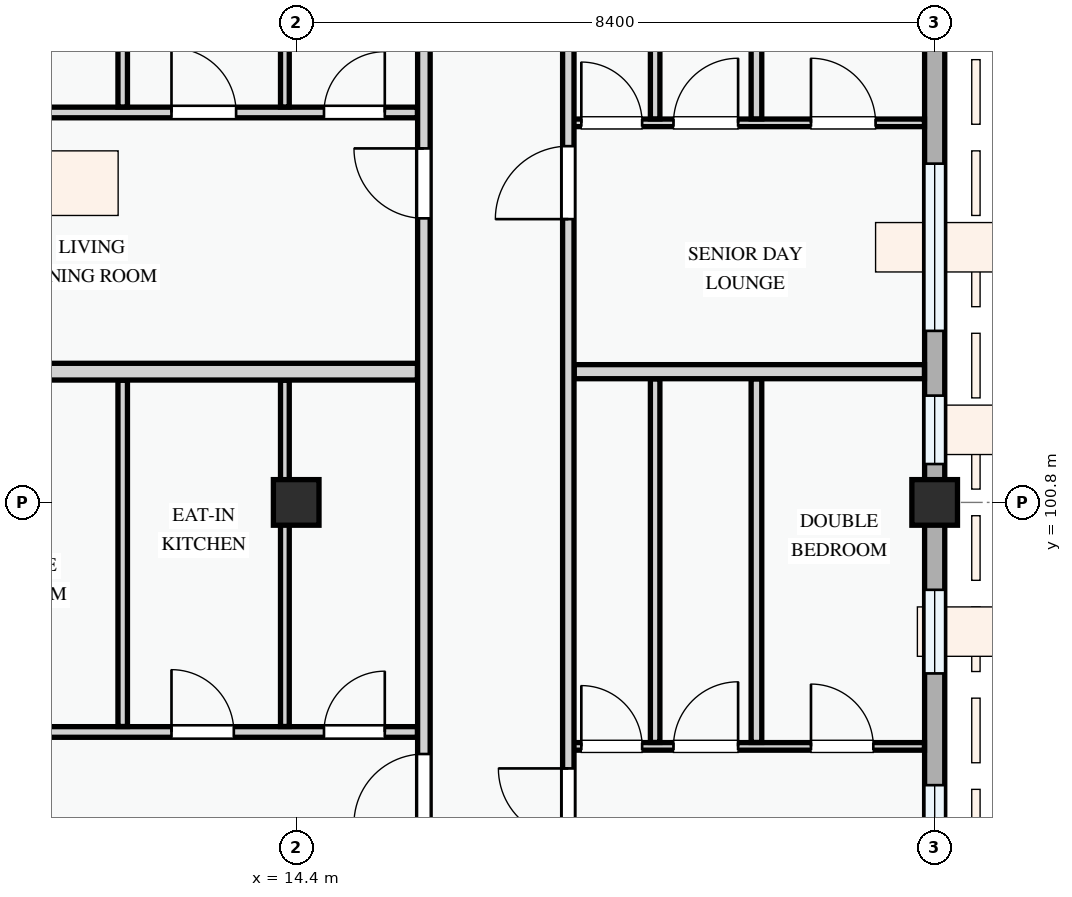
"""IFC4 building model, lengths in metres.
Left out: names, types, materials, properties, quantities, classifications, styles, units other than length and angle.
Written with IfcOpenShell. Run it as: python <this file> out.ifc"""

import sys

from ifc_helpers import new_model, si_unit, direction, frame, frame_2d, origin, origin_2d, place, context, subcontext, project, spatial, rectangle, extrude, element, fill, save


model = new_model("IFC4")
c1 = context("Model", 3, precision=1e-05, world=origin(), true_north=direction((0.0, 1.0)))
c2 = subcontext(c1, "Body", "Model", "MODEL_VIEW")
j1 = project(units=[si_unit("LENGTHUNIT", "METRE"), si_unit("PLANEANGLEUNIT", "RADIAN")], contexts=[c1])
p1 = place(None, origin())
s1 = spatial("IfcSite", under=j1, at=p1, CompositionType="ELEMENT")
p2 = place(p1, origin())
s2 = spatial("IfcBuilding", under=s1, at=p2, CompositionType="ELEMENT")
p3 = place(p2, frame((0.0, 0.0, 34.5)))
s3 = spatial("IfcBuildingStorey", under=s2, at=p3, CompositionType="ELEMENT", Elevation=34.5)
for number, where, z_axis, x_axis in (
    (1, (14.4, 100.8, 0.0), (0.0, 0.0, 1.0), (1.0, 0.0, 0.0)),
    (2, (22.8, 100.8, 0.0), (0.0, 0.0, 1.0), (1.0, 0.0, 0.0)),
):
    element("IfcColumn", number, at=place(p3, frame(where, z_axis=z_axis, x_axis=x_axis)), inside=s3, PredefinedType="COLUMN", context=c2, shape_type="SweptSolid", body=[
        extrude(rectangle(XDim=0.6, YDim=0.6, at=origin_2d()), origin(), (0.0, 0.0, 1.0), 3.3),
    ])
p4 = place(p3, frame((22.8, 94.8, 0.0), z_axis=(0.0, 0.0, 1.0), x_axis=(0.0, 1.0, 0.0)))
e3 = element("IfcWall", 3, at=p4, inside=s3, PredefinedType="STANDARD", context=c2, shape_type="SweptSolid", body=[
    extrude(rectangle(XDim=6.0, YDim=0.265, at=frame_2d((3.0, 0.0))), origin(), (0.0, 0.0, 1.0), 2.575),
])
p5 = place(p4, frame((0.7, 0.0, 0.78)))
e4 = element("IfcOpeningElement", 4, at=p5, cuts=e3, PredefinedType="OPENING", context=c2, shape_type="SweptSolid", body=[
    extrude(rectangle(XDim=1.58, YDim=1.48, at=frame_2d((0.79, 0.74))), frame((0.0, 0.143, 0.0), z_axis=(0.0, -1.0, 0.0), x_axis=(1.0, 0.0, 0.0)), (0.0, 0.0, 1.0), 0.285),
])
p6 = place(p4, frame((3.75, 0.0, 0.78)))
e5 = element("IfcOpeningElement", 5, at=p6, cuts=e3, PredefinedType="OPENING", context=c2, shape_type="SweptSolid", body=[
    extrude(rectangle(XDim=1.1, YDim=1.3, at=frame_2d((0.55, 0.65))), frame((0.0, 0.143, 0.0), z_axis=(0.0, -1.0, 0.0), x_axis=(1.0, 0.0, 0.0)), (0.0, 0.0, 1.0), 0.285),
])
p7 = place(p3, frame((22.8, 100.8, 0.0), z_axis=(0.0, 0.0, 1.0), x_axis=(0.0, 1.0, 0.0)))
e6 = element("IfcWall", 6, at=p7, inside=s3, PredefinedType="STANDARD", context=c2, shape_type="SweptSolid", body=[
    extrude(rectangle(XDim=8.4, YDim=0.265, at=frame_2d((4.2, 0.0))), origin(), (0.0, 0.0, 1.0), 2.425),
])
p8 = place(p7, frame((0.505, 0.0, 0.78)))
e7 = element("IfcOpeningElement", 7, at=p8, cuts=e6, PredefinedType="OPENING", context=c2, shape_type="SweptSolid", body=[
    extrude(rectangle(XDim=0.9, YDim=1.2, at=frame_2d((0.45, 0.6))), frame((0.0, 0.143, 0.0), z_axis=(0.0, -1.0, 0.0), x_axis=(1.0, 0.0, 0.0)), (0.0, 0.0, 1.0), 0.285),
])
p9 = place(p7, frame((2.257, 0.0, 0.78)))
e8 = element("IfcOpeningElement", 8, at=p9, cuts=e6, PredefinedType="OPENING", context=c2, shape_type="SweptSolid", body=[
    extrude(rectangle(XDim=2.2, YDim=1.5, at=frame_2d((1.1, 0.75))), frame((0.0, 0.143, 0.0), z_axis=(0.0, -1.0, 0.0), x_axis=(1.0, 0.0, 0.0)), (0.0, 0.0, 1.0), 0.285),
])
p10 = place(p7, frame((5.977, 0.0, 0.78)))
e9 = element("IfcOpeningElement", 9, at=p10, cuts=e6, PredefinedType="OPENING", context=c2, shape_type="SweptSolid", body=[
    extrude(rectangle(XDim=1.25, YDim=1.45, at=frame_2d((0.625, 0.725))), frame((0.0, 0.143, 0.0), z_axis=(0.0, -1.0, 0.0), x_axis=(1.0, 0.0, 0.0)), (0.0, 0.0, 1.0), 0.285),
])
p11 = place(p3, frame((8.534, 97.78, 0.0), z_axis=(0.0, 0.0, 1.0), x_axis=(1.0, 0.0, 0.0)))
e10 = element("IfcWall", 10, at=p11, inside=s3, PredefinedType="PARTITIONING", context=c2, shape_type="SweptSolid", body=[
    extrude(rectangle(XDim=7.461, YDim=0.14, at=frame_2d((3.73, 0.0))), origin(), (0.0, 0.0, 1.0), 3.0),
])
p12 = place(p11, frame((1.329, 0.0, 0.0)))
e11 = element("IfcOpeningElement", 11, at=p12, cuts=e10, PredefinedType="OPENING", context=c2, shape_type="SweptSolid", body=[
    extrude(rectangle(XDim=0.85, YDim=2.1, at=frame_2d((0.425, 1.05))), frame((0.0, 0.08, 0.0), z_axis=(0.0, -1.0, 0.0), x_axis=(1.0, 0.0, 0.0)), (0.0, 0.0, 1.0), 0.16),
])
p13 = place(p11, frame((4.225, 0.0, 0.0)))
e12 = element("IfcOpeningElement", 12, at=p13, cuts=e10, PredefinedType="OPENING", context=c2, shape_type="SweptSolid", body=[
    extrude(rectangle(XDim=0.82, YDim=2.08, at=frame_2d((0.41, 1.04))), frame((0.0, 0.08, 0.0), z_axis=(0.0, -1.0, 0.0), x_axis=(1.0, 0.0, 0.0)), (0.0, 0.0, 1.0), 0.16),
])
p14 = place(p11, frame((6.231, 0.0, 0.0)))
e13 = element("IfcOpeningElement", 13, at=p14, cuts=e10, PredefinedType="OPENING", context=c2, shape_type="SweptSolid", body=[
    extrude(rectangle(XDim=0.8, YDim=2.1, at=frame_2d((0.4, 1.05))), frame((0.0, 0.08, 0.0), z_axis=(0.0, -1.0, 0.0), x_axis=(1.0, 0.0, 0.0)), (0.0, 0.0, 1.0), 0.16),
])
p15 = place(p3, frame((12.118, 97.852, 0.0), z_axis=(0.0, 0.0, 1.0), x_axis=(0.0, 1.0, 0.0)))
e14 = element("IfcWall", 14, at=p15, inside=s3, PredefinedType="PARTITIONING", context=c2, shape_type="SweptSolid", body=[
    extrude(rectangle(XDim=4.556, YDim=0.125, at=frame_2d((2.278, 0.0))), origin(), (0.0, 0.0, 1.0), 3.0),
])
p16 = place(p3, frame((14.251, 97.852, 0.0), z_axis=(0.0, 0.0, 1.0), x_axis=(0.0, 1.0, 0.0)))
e15 = element("IfcWall", 15, at=p16, inside=s3, PredefinedType="PARTITIONING", context=c2, shape_type="SweptSolid", body=[
    extrude(rectangle(XDim=4.556, YDim=0.115, at=frame_2d((2.278, 0.0))), origin(), (0.0, 0.0, 1.0), 2.425),
])
p17 = place(p3, frame((17.98, 97.59, 0.0), z_axis=(0.0, 0.0, 1.0), x_axis=(1.0, 0.0, 0.0)))
e16 = element("IfcWall", 16, at=p17, inside=s3, PredefinedType="PARTITIONING", context=c2, shape_type="SweptSolid", body=[
    extrude(rectangle(XDim=4.686, YDim=0.1, at=frame_2d((2.343, 0.0))), origin(), (0.0, 0.0, 1.0), 3.0),
])
p18 = place(p17, frame((0.171, 0.0, 0.0)))
e17 = element("IfcOpeningElement", 17, at=p18, cuts=e16, PredefinedType="OPENING", context=c2, shape_type="SweptSolid", body=[
    extrude(rectangle(XDim=0.8, YDim=2.1, at=frame_2d((0.4, 1.05))), frame((0.0, 0.06, 0.0), z_axis=(0.0, -1.0, 0.0), x_axis=(1.0, 0.0, 0.0)), (0.0, 0.0, 1.0), 0.12),
])
p19 = place(p17, frame((1.384, 0.0, 0.0)))
e18 = element("IfcOpeningElement", 18, at=p19, cuts=e16, PredefinedType="OPENING", context=c2, shape_type="SweptSolid", body=[
    extrude(rectangle(XDim=0.85, YDim=2.1, at=frame_2d((0.425, 1.05))), frame((0.0, 0.06, 0.0), z_axis=(0.0, -1.0, 0.0), x_axis=(1.0, 0.0, 0.0)), (0.0, 0.0, 1.0), 0.12),
])
p20 = place(p17, frame((3.193, 0.0, 0.0)))
e19 = element("IfcOpeningElement", 19, at=p20, cuts=e16, PredefinedType="OPENING", context=c2, shape_type="SweptSolid", body=[
    extrude(rectangle(XDim=0.82, YDim=2.08, at=frame_2d((0.41, 1.04))), frame((0.0, 0.06, 0.0), z_axis=(0.0, -1.0, 0.0), x_axis=(1.0, 0.0, 0.0)), (0.0, 0.0, 1.0), 0.12),
])
p21 = place(p3, frame((20.455, 97.642, 0.0), z_axis=(0.0, 0.0, 1.0), x_axis=(0.0, 1.0, 0.0)))
e20 = element("IfcWall", 20, at=p21, inside=s3, PredefinedType="PARTITIONING", context=c2, shape_type="SweptSolid", body=[
    extrude(rectangle(XDim=4.783, YDim=0.14, at=frame_2d((2.392, 0.0))), origin(), (0.0, 0.0, 1.0), 3.0),
])
p22 = place(p3, frame((19.122, 97.642, 0.0), z_axis=(0.0, 0.0, 1.0), x_axis=(0.0, 1.0, 0.0)))
e21 = element("IfcWall", 21, at=p22, inside=s3, PredefinedType="PARTITIONING", context=c2, shape_type="SweptSolid", body=[
    extrude(rectangle(XDim=4.783, YDim=0.125, at=frame_2d((2.392, 0.0))), origin(), (0.0, 0.0, 1.0), 3.0),
])
p23 = place(p3, frame((8.534, 105.93, 0.0), z_axis=(0.0, 0.0, 1.0), x_axis=(1.0, 0.0, 0.0)))
e22 = element("IfcWall", 22, at=p23, inside=s3, PredefinedType="PARTITIONING", context=c2, shape_type="SweptSolid", body=[
    extrude(rectangle(XDim=7.461, YDim=0.14, at=frame_2d((3.73, 0.0))), origin(), (0.0, 0.0, 1.0), 3.0),
])
p24 = place(p23, frame((1.329, 0.0, 0.0)))
e23 = element("IfcOpeningElement", 23, at=p24, cuts=e22, PredefinedType="OPENING", context=c2, shape_type="SweptSolid", body=[
    extrude(rectangle(XDim=0.85, YDim=2.1, at=frame_2d((0.425, 1.05))), frame((0.0, 0.08, 0.0), z_axis=(0.0, -1.0, 0.0), x_axis=(1.0, 0.0, 0.0)), (0.0, 0.0, 1.0), 0.16),
])
p25 = place(p23, frame((4.225, 0.0, 0.0)))
e24 = element("IfcOpeningElement", 24, at=p25, cuts=e22, PredefinedType="OPENING", context=c2, shape_type="SweptSolid", body=[
    extrude(rectangle(XDim=0.85, YDim=2.1, at=frame_2d((0.425, 1.05))), frame((0.0, 0.08, 0.0), z_axis=(0.0, -1.0, 0.0), x_axis=(1.0, 0.0, 0.0)), (0.0, 0.0, 1.0), 0.16),
])
p26 = place(p23, frame((6.231, 0.0, 0.0)))
e25 = element("IfcOpeningElement", 25, at=p26, cuts=e22, PredefinedType="OPENING", context=c2, shape_type="SweptSolid", body=[
    extrude(rectangle(XDim=0.8, YDim=2.1, at=frame_2d((0.4, 1.05))), frame((0.0, 0.08, 0.0), z_axis=(0.0, -1.0, 0.0), x_axis=(1.0, 0.0, 0.0)), (0.0, 0.0, 1.0), 0.16),
])
p27 = place(p3, frame((12.118, 106.002, 0.0), z_axis=(0.0, 0.0, 1.0), x_axis=(0.0, 1.0, 0.0)))
e26 = element("IfcWall", 26, at=p27, inside=s3, PredefinedType="PARTITIONING", context=c2, shape_type="SweptSolid", body=[
    extrude(rectangle(XDim=3.236, YDim=0.125, at=frame_2d((1.618, 0.0))), origin(), (0.0, 0.0, 1.0), 3.0),
])
p28 = place(p3, frame((14.251, 106.002, 0.0), z_axis=(0.0, 0.0, 1.0), x_axis=(0.0, 1.0, 0.0)))
e27 = element("IfcWall", 27, at=p28, inside=s3, PredefinedType="PARTITIONING", context=c2, shape_type="SweptSolid", body=[
    extrude(rectangle(XDim=3.236, YDim=0.115, at=frame_2d((1.618, 0.0))), origin(), (0.0, 0.0, 1.0), 2.425),
])
p29 = place(p3, frame((17.98, 105.794, 0.0), z_axis=(0.0, 0.0, 1.0), x_axis=(1.0, 0.0, 0.0)))
e28 = element("IfcWall", 28, at=p29, inside=s3, PredefinedType="PARTITIONING", context=c2, shape_type="SweptSolid", body=[
    extrude(rectangle(XDim=4.686, YDim=0.1, at=frame_2d((2.343, 0.0))), origin(), (0.0, 0.0, 1.0), 3.0),
])
p30 = place(p29, frame((0.171, 0.0, 0.0)))
e29 = element("IfcOpeningElement", 29, at=p30, cuts=e28, PredefinedType="OPENING", context=c2, shape_type="SweptSolid", body=[
    extrude(rectangle(XDim=0.8, YDim=2.1, at=frame_2d((0.4, 1.05))), frame((0.0, 0.06, 0.0), z_axis=(0.0, -1.0, 0.0), x_axis=(1.0, 0.0, 0.0)), (0.0, 0.0, 1.0), 0.12),
])
p31 = place(p29, frame((1.384, 0.0, 0.0)))
e30 = element("IfcOpeningElement", 30, at=p31, cuts=e28, PredefinedType="OPENING", context=c2, shape_type="SweptSolid", body=[
    extrude(rectangle(XDim=0.85, YDim=2.1, at=frame_2d((0.425, 1.05))), frame((0.0, 0.06, 0.0), z_axis=(0.0, -1.0, 0.0), x_axis=(1.0, 0.0, 0.0)), (0.0, 0.0, 1.0), 0.12),
])
p32 = place(p29, frame((3.193, 0.0, 0.0)))
e31 = element("IfcOpeningElement", 31, at=p32, cuts=e28, PredefinedType="OPENING", context=c2, shape_type="SweptSolid", body=[
    extrude(rectangle(XDim=0.85, YDim=2.1, at=frame_2d((0.425, 1.05))), frame((0.0, 0.06, 0.0), z_axis=(0.0, -1.0, 0.0), x_axis=(1.0, 0.0, 0.0)), (0.0, 0.0, 1.0), 0.12),
])
p33 = place(p3, frame((20.455, 105.846, 0.0), z_axis=(0.0, 0.0, 1.0), x_axis=(0.0, 1.0, 0.0)))
e32 = element("IfcWall", 32, at=p33, inside=s3, PredefinedType="PARTITIONING", context=c2, shape_type="SweptSolid", body=[
    extrude(rectangle(XDim=3.382, YDim=0.14, at=frame_2d((1.691, 0.0))), origin(), (0.0, 0.0, 1.0), 3.0),
])
p34 = place(p3, frame((19.122, 105.846, 0.0), z_axis=(0.0, 0.0, 1.0), x_axis=(0.0, 1.0, 0.0)))
e33 = element("IfcWall", 33, at=p34, inside=s3, PredefinedType="PARTITIONING", context=c2, shape_type="SweptSolid", body=[
    extrude(rectangle(XDim=3.382, YDim=0.125, at=frame_2d((1.691, 0.0))), origin(), (0.0, 0.0, 1.0), 3.0),
])
p35 = place(p3, frame((8.534, 102.52, 0.0), z_axis=(0.0, 0.0, 1.0), x_axis=(1.0, 0.0, 0.0)))
e34 = element("IfcWall", 34, at=p35, inside=s3, PredefinedType="PARTITIONING", context=c2, shape_type="SweptSolid", body=[
    extrude(rectangle(XDim=7.461, YDim=0.22, at=frame_2d((3.73, 0.0))), origin(), (0.0, 0.0, 1.0), 3.0),
])
p36 = place(p3, frame((18.057, 102.52, 0.0), z_axis=(0.0, 0.0, 1.0), x_axis=(1.0, 0.0, 0.0)))
e35 = element("IfcWall", 35, at=p36, inside=s3, PredefinedType="PARTITIONING", context=c2, shape_type="SweptSolid", body=[
    extrude(rectangle(XDim=4.609, YDim=0.185, at=frame_2d((2.304, 0.0))), origin(), (0.0, 0.0, 1.0), 3.0),
])
p37 = place(p3, frame((16.08, 86.534, 0.0), z_axis=(0.0, 0.0, 1.0), x_axis=(0.0, 1.0, 0.0)))
e36 = element("IfcWall", 36, at=p37, inside=s3, PredefinedType="PARTITIONING", context=c2, shape_type="SweptSolid", body=[
    extrude(rectangle(XDim=22.806, YDim=0.165, at=frame_2d((11.403, 0.0))), origin(), (0.0, 0.0, 1.0), 3.0),
])
p38 = place(p37, frame((2.006, 0.0, 0.0)))
e37 = element("IfcOpeningElement", 37, at=p38, cuts=e36, PredefinedType="OPENING", context=c2, shape_type="SweptSolid", body=[
    extrude(rectangle(XDim=0.96, YDim=2.12, at=frame_2d((0.48, 1.06))), frame((0.0, 0.093, 0.0), z_axis=(0.0, -1.0, 0.0), x_axis=(1.0, 0.0, 0.0)), (0.0, 0.0, 1.0), 0.185),
])
p39 = place(p37, frame((10.035, 0.0, 0.0)))
e38 = element("IfcOpeningElement", 38, at=p39, cuts=e36, PredefinedType="OPENING", context=c2, shape_type="SweptSolid", body=[
    extrude(rectangle(XDim=0.92, YDim=2.1, at=frame_2d((0.46, 1.05))), frame((0.0, 0.093, 0.0), z_axis=(0.0, -1.0, 0.0), x_axis=(1.0, 0.0, 0.0)), (0.0, 0.0, 1.0), 0.185),
])
p40 = place(p37, frame((18.003, 0.0, 0.0)))
e39 = element("IfcOpeningElement", 39, at=p40, cuts=e36, PredefinedType="OPENING", context=c2, shape_type="SweptSolid", body=[
    extrude(rectangle(XDim=0.92, YDim=2.1, at=frame_2d((0.46, 1.05))), frame((0.0, 0.093, 0.0), z_axis=(0.0, -1.0, 0.0), x_axis=(1.0, 0.0, 0.0)), (0.0, 0.0, 1.0), 0.185),
])
p41 = place(p3, frame((17.98, 86.534, 0.0), z_axis=(0.0, 0.0, 1.0), x_axis=(0.0, 1.0, 0.0)))
e40 = element("IfcWall", 40, at=p41, inside=s3, PredefinedType="PARTITIONING", context=c2, shape_type="SweptSolid", body=[
    extrude(rectangle(XDim=22.806, YDim=0.15, at=frame_2d((11.403, 0.0))), origin(), (0.0, 0.0, 1.0), 3.0),
])
p42 = place(p41, frame((1.874, 0.0, 0.0)))
e41 = element("IfcOpeningElement", 41, at=p42, cuts=e40, PredefinedType="OPENING", context=c2, shape_type="SweptSolid", body=[
    extrude(rectangle(XDim=0.92, YDim=2.1, at=frame_2d((0.46, 1.05))), frame((0.0, 0.085, 0.0), z_axis=(0.0, -1.0, 0.0), x_axis=(1.0, 0.0, 0.0)), (0.0, 0.0, 1.0), 0.17),
])
p43 = place(p41, frame((9.846, 0.0, 0.0)))
e42 = element("IfcOpeningElement", 42, at=p43, cuts=e40, PredefinedType="OPENING", context=c2, shape_type="SweptSolid", body=[
    extrude(rectangle(XDim=0.92, YDim=2.1, at=frame_2d((0.46, 1.05))), frame((0.0, 0.085, 0.0), z_axis=(0.0, -1.0, 0.0), x_axis=(1.0, 0.0, 0.0)), (0.0, 0.0, 1.0), 0.17),
])
p44 = place(p41, frame((17.992, 0.0, 0.0)))
e43 = element("IfcOpeningElement", 43, at=p44, cuts=e40, PredefinedType="OPENING", context=c2, shape_type="SweptSolid", body=[
    extrude(rectangle(XDim=0.96, YDim=2.12, at=frame_2d((0.48, 1.06))), frame((0.0, 0.085, 0.0), z_axis=(0.0, -1.0, 0.0), x_axis=(1.0, 0.0, 0.0)), (0.0, 0.0, 1.0), 0.17),
])
p45 = place(p5, origin())
e44 = element("IfcWindow", 44, at=p45, inside=s3, PartitioningType="SINGLE_PANEL", PredefinedType="WINDOW", context=c2, shape_type="SweptSolid", body=[
    extrude(rectangle(XDim=1.58, YDim=1.48, at=frame_2d((0.79, 0.74))), frame((0.0, 0.03, 0.0), z_axis=(0.0, -1.0, 0.0), x_axis=(1.0, 0.0, 0.0)), (0.0, 0.0, 1.0), 0.06),
])
fill(e4, e44)
p46 = place(p6, origin())
e45 = element("IfcWindow", 45, at=p46, inside=s3, PartitioningType="SINGLE_PANEL", PredefinedType="WINDOW", context=c2, shape_type="SweptSolid", body=[
    extrude(rectangle(XDim=1.1, YDim=1.3, at=frame_2d((0.55, 0.65))), frame((0.0, 0.03, 0.0), z_axis=(0.0, -1.0, 0.0), x_axis=(1.0, 0.0, 0.0)), (0.0, 0.0, 1.0), 0.06),
])
fill(e5, e45)
p47 = place(p8, origin())
e46 = element("IfcWindow", 46, at=p47, inside=s3, PartitioningType="SINGLE_PANEL", PredefinedType="WINDOW", context=c2, shape_type="SweptSolid", body=[
    extrude(rectangle(XDim=0.9, YDim=1.2, at=frame_2d((0.45, 0.6))), frame((0.0, 0.03, 0.0), z_axis=(0.0, -1.0, 0.0), x_axis=(1.0, 0.0, 0.0)), (0.0, 0.0, 1.0), 0.06),
])
fill(e7, e46)
p48 = place(p9, origin())
e47 = element("IfcWindow", 47, at=p48, inside=s3, PartitioningType="DOUBLE_PANEL_VERTICAL", PredefinedType="WINDOW", context=c2, shape_type="SweptSolid", body=[
    extrude(rectangle(XDim=2.2, YDim=1.5, at=frame_2d((1.1, 0.75))), frame((0.0, 0.03, 0.0), z_axis=(0.0, -1.0, 0.0), x_axis=(1.0, 0.0, 0.0)), (0.0, 0.0, 1.0), 0.06),
])
fill(e8, e47)
p49 = place(p13, origin())
e48 = element("IfcDoor", 48, at=p49, inside=s3, OperationType="SINGLE_SWING_LEFT", PredefinedType="DOOR", context=c2, shape_type="SweptSolid", body=[
    extrude(rectangle(XDim=0.82, YDim=2.08, at=frame_2d((0.41, 1.04))), frame((0.0, 0.025, 0.0), z_axis=(0.0, -1.0, 0.0), x_axis=(1.0, 0.0, 0.0)), (0.0, 0.0, 1.0), 0.05),
])
fill(e12, e48)
p50 = place(p14, origin())
e49 = element("IfcDoor", 49, at=p50, inside=s3, OperationType="SINGLE_SWING_RIGHT", PredefinedType="DOOR", context=c2, shape_type="SweptSolid", body=[
    extrude(rectangle(XDim=0.8, YDim=2.1, at=frame_2d((0.4, 1.05))), frame((0.0, 0.025, 0.0), z_axis=(0.0, -1.0, 0.0), x_axis=(1.0, 0.0, 0.0)), (0.0, 0.0, 1.0), 0.05),
])
fill(e13, e49)
p51 = place(p18, origin())
e50 = element("IfcDoor", 50, at=p51, inside=s3, OperationType="SINGLE_SWING_LEFT", PredefinedType="DOOR", context=c2, shape_type="SweptSolid", body=[
    extrude(rectangle(XDim=0.8, YDim=2.1, at=frame_2d((0.4, 1.05))), frame((0.0, 0.025, 0.0), z_axis=(0.0, -1.0, 0.0), x_axis=(1.0, 0.0, 0.0)), (0.0, 0.0, 1.0), 0.05),
])
fill(e17, e50)
p52 = place(p19, origin())
e51 = element("IfcDoor", 51, at=p52, inside=s3, OperationType="SINGLE_SWING_RIGHT", PredefinedType="DOOR", context=c2, shape_type="SweptSolid", body=[
    extrude(rectangle(XDim=0.85, YDim=2.1, at=frame_2d((0.425, 1.05))), frame((0.0, 0.025, 0.0), z_axis=(0.0, -1.0, 0.0), x_axis=(1.0, 0.0, 0.0)), (0.0, 0.0, 1.0), 0.05),
])
fill(e18, e51)
p53 = place(p20, origin())
e52 = element("IfcDoor", 52, at=p53, inside=s3, OperationType="SINGLE_SWING_LEFT", PredefinedType="DOOR", context=c2, shape_type="SweptSolid", body=[
    extrude(rectangle(XDim=0.82, YDim=2.08, at=frame_2d((0.41, 1.04))), frame((0.0, 0.025, 0.0), z_axis=(0.0, -1.0, 0.0), x_axis=(1.0, 0.0, 0.0)), (0.0, 0.0, 1.0), 0.05),
])
fill(e19, e52)
p54 = place(p25, origin())
e53 = element("IfcDoor", 53, at=p54, inside=s3, OperationType="SINGLE_SWING_LEFT", PredefinedType="DOOR", context=c2, shape_type="SweptSolid", body=[
    extrude(rectangle(XDim=0.85, YDim=2.1, at=frame_2d((0.425, 1.05))), frame((0.0, 0.025, 0.0), z_axis=(0.0, -1.0, 0.0), x_axis=(1.0, 0.0, 0.0)), (0.0, 0.0, 1.0), 0.05),
])
fill(e24, e53)
p55 = place(p26, origin())
e54 = element("IfcDoor", 54, at=p55, inside=s3, OperationType="SINGLE_SWING_RIGHT", PredefinedType="DOOR", context=c2, shape_type="SweptSolid", body=[
    extrude(rectangle(XDim=0.8, YDim=2.1, at=frame_2d((0.4, 1.05))), frame((0.0, 0.025, 0.0), z_axis=(0.0, -1.0, 0.0), x_axis=(1.0, 0.0, 0.0)), (0.0, 0.0, 1.0), 0.05),
])
fill(e25, e54)
p56 = place(p30, origin())
e55 = element("IfcDoor", 55, at=p56, inside=s3, OperationType="SINGLE_SWING_LEFT", PredefinedType="DOOR", context=c2, shape_type="SweptSolid", body=[
    extrude(rectangle(XDim=0.8, YDim=2.1, at=frame_2d((0.4, 1.05))), frame((0.0, 0.025, 0.0), z_axis=(0.0, -1.0, 0.0), x_axis=(1.0, 0.0, 0.0)), (0.0, 0.0, 1.0), 0.05),
])
fill(e29, e55)
p57 = place(p31, origin())
e56 = element("IfcDoor", 56, at=p57, inside=s3, OperationType="SINGLE_SWING_RIGHT", PredefinedType="DOOR", context=c2, shape_type="SweptSolid", body=[
    extrude(rectangle(XDim=0.85, YDim=2.1, at=frame_2d((0.425, 1.05))), frame((0.0, 0.025, 0.0), z_axis=(0.0, -1.0, 0.0), x_axis=(1.0, 0.0, 0.0)), (0.0, 0.0, 1.0), 0.05),
])
fill(e30, e56)
p58 = place(p32, origin())
e57 = element("IfcDoor", 57, at=p58, inside=s3, OperationType="SINGLE_SWING_LEFT", PredefinedType="DOOR", context=c2, shape_type="SweptSolid", body=[
    extrude(rectangle(XDim=0.85, YDim=2.1, at=frame_2d((0.425, 1.05))), frame((0.0, 0.025, 0.0), z_axis=(0.0, -1.0, 0.0), x_axis=(1.0, 0.0, 0.0)), (0.0, 0.0, 1.0), 0.05),
])
fill(e31, e57)
p59 = place(p39, origin())
e58 = element("IfcDoor", 58, at=p59, inside=s3, OperationType="SINGLE_SWING_LEFT", PredefinedType="DOOR", context=c2, shape_type="SweptSolid", body=[
    extrude(rectangle(XDim=0.92, YDim=2.1, at=frame_2d((0.46, 1.05))), frame((0.0, 0.025, 0.0), z_axis=(0.0, -1.0, 0.0), x_axis=(1.0, 0.0, 0.0)), (0.0, 0.0, 1.0), 0.05),
])
fill(e38, e58)
p60 = place(p40, origin())
e59 = element("IfcDoor", 59, at=p60, inside=s3, OperationType="SINGLE_SWING_RIGHT", PredefinedType="DOOR", context=c2, shape_type="SweptSolid", body=[
    extrude(rectangle(XDim=0.92, YDim=2.1, at=frame_2d((0.46, 1.05))), frame((0.0, 0.025, 0.0), z_axis=(0.0, -1.0, 0.0), x_axis=(1.0, 0.0, 0.0)), (0.0, 0.0, 1.0), 0.05),
])
fill(e39, e59)
p61 = place(p43, origin())
e60 = element("IfcDoor", 60, at=p61, inside=s3, OperationType="SINGLE_SWING_RIGHT", PredefinedType="DOOR", context=c2, shape_type="SweptSolid", body=[
    extrude(rectangle(XDim=0.92, YDim=2.1, at=frame_2d((0.46, 1.05))), frame((0.0, 0.025, 0.0), z_axis=(0.0, -1.0, 0.0), x_axis=(1.0, 0.0, 0.0)), (0.0, 0.0, 1.0), 0.05),
])
fill(e42, e60)
p62 = place(p44, origin())
e61 = element("IfcDoor", 61, at=p62, inside=s3, OperationType="SINGLE_SWING_LEFT", PredefinedType="DOOR", context=c2, shape_type="SweptSolid", body=[
    extrude(rectangle(XDim=0.96, YDim=2.12, at=frame_2d((0.48, 1.06))), frame((0.0, 0.025, 0.0), z_axis=(0.0, -1.0, 0.0), x_axis=(1.0, 0.0, 0.0)), (0.0, 0.0, 1.0), 0.05),
])
fill(e43, e61)
save(model, sys.argv[1])
